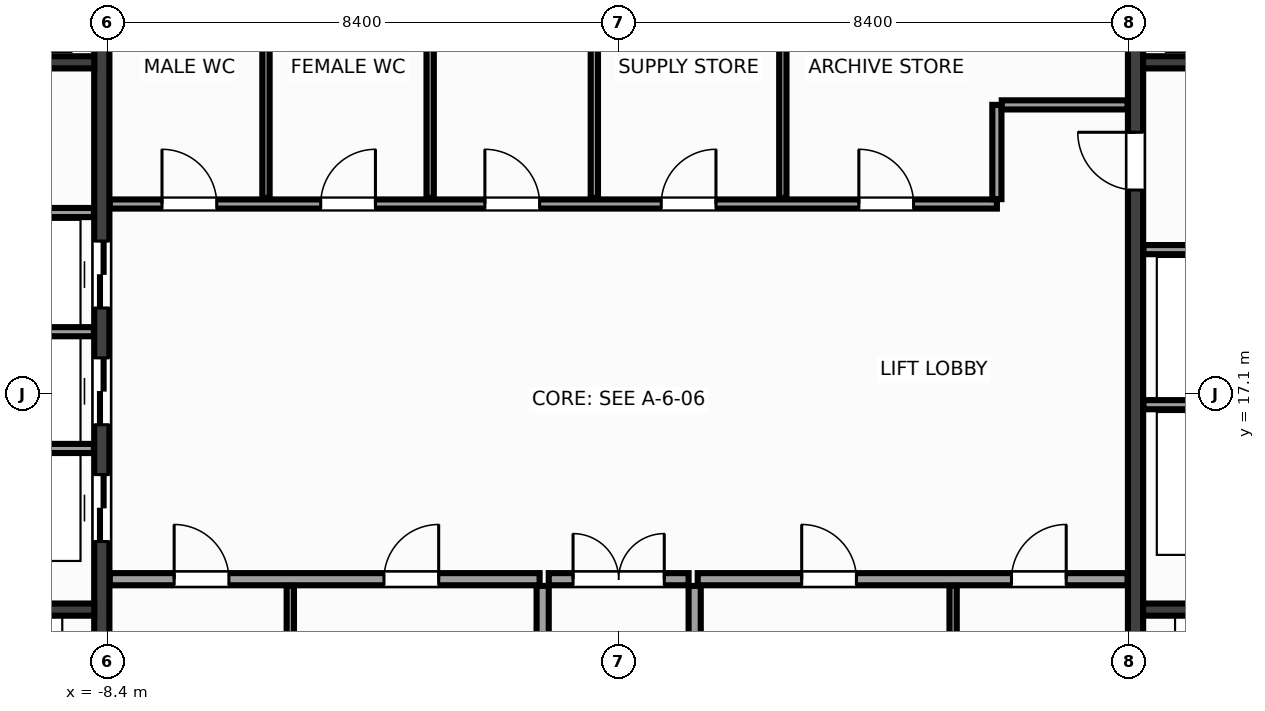
"""IFC4 building model, lengths in metres.
Left out: names, types, materials, properties, quantities, classifications, styles, units other than length and angle.
Written with IfcOpenShell. Run it as: python <this file> out.ifc"""

import sys

from ifc_helpers import new_model, si_unit, direction, frame, frame_2d, origin, place, context, subcontext, project, spatial, rectangle, extrude, source, transform, mapped, element, fill, save


model = new_model("IFC4")
c1 = context("Model", 3, precision=1e-05, world=origin(), true_north=direction((0.0, 1.0)))
c2 = subcontext(c1, "Body", "Model", "MODEL_VIEW")
j1 = project(units=[si_unit("LENGTHUNIT", "METRE"), si_unit("PLANEANGLEUNIT", "RADIAN")], contexts=[c1])
p1 = place(None, origin())
s1 = spatial("IfcSite", under=j1, at=p1, CompositionType="ELEMENT")
p2 = place(p1, origin())
s2 = spatial("IfcBuilding", under=s1, at=p2, CompositionType="ELEMENT")
p3 = place(p2, frame((0.0, 0.0, 261.2)))
s3 = spatial("IfcBuildingStorey", under=s2, at=p3, CompositionType="ELEMENT", Elevation=261.2)
m1 = source(origin(), c2, "Body", "SweptSolid", [
    extrude(rectangle(XDim=13.1, YDim=0.25, at=frame_2d((6.55, 0.0))), origin(), (0.0, 0.0, 1.0), 3.6),
])
p4 = place(p3, frame((-8.5, 10.45, 0.0), z_axis=(0.0, 0.0, 1.0), x_axis=(0.0, 1.0, 0.0)))
e1 = element("IfcWall", 1, at=p4, inside=s3, PredefinedType="SHEAR", context=c2, shape_type="MappedRepresentation", body=[
    mapped(m1, transform((0.0, 0.0, 0.0), x_axis=(1.0, 0.0, 0.0), y_axis=(0.0, 1.0, 0.0), z_axis=(0.0, 0.0, 1.0), scale=1.0)),
])
p5 = place(p4, frame((4.22, 0.0, 0.0)))
e2 = element("IfcOpeningElement", 2, at=p5, cuts=e1, PredefinedType="OPENING", context=c2, shape_type="SweptSolid", body=[
    extrude(rectangle(XDim=1.1, YDim=2.15, at=frame_2d((0.55, 1.075))), frame((0.0, 0.137, 0.0), z_axis=(0.0, -1.0, 0.0), x_axis=(1.0, 0.0, 0.0)), (0.0, 0.0, 1.0), 0.274),
])
p6 = place(p4, frame((6.14, 0.0, 0.0)))
e3 = element("IfcOpeningElement", 3, at=p6, cuts=e1, PredefinedType="OPENING", context=c2, shape_type="SweptSolid", body=[
    extrude(rectangle(XDim=1.1, YDim=2.15, at=frame_2d((0.55, 1.075))), frame((0.0, 0.137, 0.0), z_axis=(0.0, -1.0, 0.0), x_axis=(1.0, 0.0, 0.0)), (0.0, 0.0, 1.0), 0.274),
])
p7 = place(p4, frame((8.06, 0.0, 0.0)))
e4 = element("IfcOpeningElement", 4, at=p7, cuts=e1, PredefinedType="OPENING", context=c2, shape_type="SweptSolid", body=[
    extrude(rectangle(XDim=1.1, YDim=2.15, at=frame_2d((0.55, 1.075))), frame((0.0, 0.137, 0.0), z_axis=(0.0, -1.0, 0.0), x_axis=(1.0, 0.0, 0.0)), (0.0, 0.0, 1.0), 0.274),
])
p8 = place(p3, frame((8.5, 10.45, 0.0), z_axis=(0.0, 0.0, 1.0), x_axis=(0.0, 1.0, 0.0)))
e5 = element("IfcWall", 5, at=p8, inside=s3, PredefinedType="SHEAR", context=c2, shape_type="MappedRepresentation", body=[
    mapped(m1, transform((0.0, 0.0, 0.0), x_axis=(1.0, 0.0, 0.0), y_axis=(0.0, 1.0, 0.0), z_axis=(0.0, 0.0, 1.0), scale=1.0)),
])
p9 = place(p8, frame((10.0, 0.0, 0.0)))
e6 = element("IfcOpeningElement", 6, at=p9, cuts=e5, PredefinedType="OPENING", context=c2, shape_type="SweptSolid", body=[
    extrude(rectangle(XDim=0.95, YDim=2.15, at=frame_2d((0.475, 1.075))), frame((0.0, 0.137, 0.0), z_axis=(0.0, -1.0, 0.0), x_axis=(1.0, 0.0, 0.0)), (0.0, 0.0, 1.0), 0.274),
])
m2 = source(origin(), c2, "Body", "SweptSolid", [
    extrude(rectangle(XDim=2.825, YDim=0.2, at=frame_2d((1.413, 0.0))), origin(), (0.0, 0.0, 1.0), 3.6),
])
for number, where, z_axis, x_axis in (
    (7, (-11.45, 13.55, 0.0), (0.0, 0.0, 1.0), (1.0, 0.0, 0.0)),
    (8, (8.625, 13.55, 0.0), (0.0, 0.0, 1.0), (1.0, 0.0, 0.0)),
):
    element("IfcWall", number, at=place(p3, frame(where, z_axis=z_axis, x_axis=x_axis)), inside=s3, PredefinedType="SHEAR", context=c2, shape_type="MappedRepresentation", body=[
        mapped(m2, transform((0.0, 0.0, 0.0), x_axis=(1.0, 0.0, 0.0), y_axis=(0.0, 1.0, 0.0), z_axis=(0.0, 0.0, 1.0), scale=1.0)),
    ])
m3 = source(origin(), c2, "Body", "SweptSolid", [
    extrude(rectangle(XDim=3.02, YDim=0.2, at=frame_2d((1.51, 0.0))), origin(), (0.0, 0.0, 1.0), 3.6),
])
for number, where, z_axis, x_axis in (
    (9, (-11.645, 22.55, 0.0), (0.0, 0.0, 1.0), (1.0, 0.0, 0.0)),
    (10, (8.625, 22.55, 0.0), (0.0, 0.0, 1.0), (1.0, 0.0, 0.0)),
):
    element("IfcWall", number, at=place(p3, frame(where, z_axis=z_axis, x_axis=x_axis)), inside=s3, PredefinedType="SHEAR", context=c2, shape_type="MappedRepresentation", body=[
        mapped(m3, transform((0.0, 0.0, 0.0), x_axis=(1.0, 0.0, 0.0), y_axis=(0.0, 1.0, 0.0), z_axis=(0.0, 0.0, 1.0), scale=1.0)),
    ])
m4 = source(origin(), c2, "Body", "SweptSolid", [
    extrude(rectangle(XDim=3.01, YDim=0.15, at=frame_2d((1.505, 0.0))), origin(), (0.0, 0.0, 1.0), 3.37),
])
for number, where, z_axis, x_axis in (
    (11, (-11.64, 16.2, 0.0), (0.0, 0.0, 1.0), (1.0, 0.0, 0.0)),
    (12, (-11.64, 18.12, 0.0), (0.0, 0.0, 1.0), (1.0, 0.0, 0.0)),
    (13, (-11.64, 20.08, 0.0), (0.0, 0.0, 1.0), (1.0, 0.0, 0.0)),
    (14, (8.63, 16.92, 0.0), (0.0, 0.0, 1.0), (1.0, 0.0, 0.0)),
    (15, (8.63, 19.47, 0.0), (0.0, 0.0, 1.0), (1.0, 0.0, 0.0)),
):
    element("IfcWall", number, at=place(p3, frame(where, z_axis=z_axis, x_axis=x_axis)), inside=s3, PredefinedType="PARTITIONING", context=c2, shape_type="MappedRepresentation", body=[
        mapped(m4, transform((0.0, 0.0, 0.0), x_axis=(1.0, 0.0, 0.0), y_axis=(0.0, 1.0, 0.0), z_axis=(0.0, 0.0, 1.0), scale=1.0)),
    ])
m5 = source(origin(), c2, "Body", "SweptSolid", [
    extrude(rectangle(XDim=7.07, YDim=0.2, at=frame_2d((3.535, 0.0))), origin(), (0.0, 0.0, 1.0), 3.37),
])
p10 = place(p3, frame((-8.37, 14.05, 0.0), z_axis=(0.0, 0.0, 1.0), x_axis=(1.0, 0.0, 0.0)))
e16 = element("IfcWall", 16, at=p10, inside=s3, PredefinedType="PARTITIONING", context=c2, shape_type="MappedRepresentation", body=[
    mapped(m5, transform((0.0, 0.0, 0.0), x_axis=(1.0, 0.0, 0.0), y_axis=(0.0, 1.0, 0.0), z_axis=(0.0, 0.0, 1.0), scale=1.0)),
])
p11 = place(p10, frame((1.06, 0.0, 0.0)))
e17 = element("IfcOpeningElement", 17, at=p11, cuts=e16, PredefinedType="OPENING", context=c2, shape_type="SweptSolid", body=[
    extrude(rectangle(XDim=0.9, YDim=2.15, at=frame_2d((0.45, 1.075))), frame((0.0, 0.112, 0.0), z_axis=(0.0, -1.0, 0.0), x_axis=(1.0, 0.0, 0.0)), (0.0, 0.0, 1.0), 0.224),
])
p12 = place(p10, frame((4.51, 0.0, 0.0)))
e18 = element("IfcOpeningElement", 18, at=p12, cuts=e16, PredefinedType="OPENING", context=c2, shape_type="SweptSolid", body=[
    extrude(rectangle(XDim=0.9, YDim=2.15, at=frame_2d((0.45, 1.075))), frame((0.0, 0.112, 0.0), z_axis=(0.0, -1.0, 0.0), x_axis=(1.0, 0.0, 0.0)), (0.0, 0.0, 1.0), 0.224),
])
p13 = place(p3, frame((1.3, 14.05, 0.0), z_axis=(0.0, 0.0, 1.0), x_axis=(1.0, 0.0, 0.0)))
e19 = element("IfcWall", 19, at=p13, inside=s3, PredefinedType="PARTITIONING", context=c2, shape_type="MappedRepresentation", body=[
    mapped(m5, transform((0.0, 0.0, 0.0), x_axis=(1.0, 0.0, 0.0), y_axis=(0.0, 1.0, 0.0), z_axis=(0.0, 0.0, 1.0), scale=1.0)),
])
p14 = place(p13, frame((1.71, 0.0, 0.0)))
e20 = element("IfcOpeningElement", 20, at=p14, cuts=e19, PredefinedType="OPENING", context=c2, shape_type="SweptSolid", body=[
    extrude(rectangle(XDim=0.9, YDim=2.15, at=frame_2d((0.45, 1.075))), frame((0.0, 0.112, 0.0), z_axis=(0.0, -1.0, 0.0), x_axis=(1.0, 0.0, 0.0)), (0.0, 0.0, 1.0), 0.224),
])
p15 = place(p13, frame((5.16, 0.0, 0.0)))
e21 = element("IfcOpeningElement", 21, at=p15, cuts=e19, PredefinedType="OPENING", context=c2, shape_type="SweptSolid", body=[
    extrude(rectangle(XDim=0.9, YDim=2.15, at=frame_2d((0.45, 1.075))), frame((0.0, 0.112, 0.0), z_axis=(0.0, -1.0, 0.0), x_axis=(1.0, 0.0, 0.0)), (0.0, 0.0, 1.0), 0.224),
])
m6 = source(origin(), c2, "Body", "SweptSolid", [
    extrude(rectangle(XDim=3.49, YDim=0.2, at=frame_2d((1.745, 0.0))), origin(), (0.0, 0.0, 1.0), 3.37),
])
for number, where, z_axis, x_axis in (
    (22, (-1.25, 10.45, 0.0), (0.0, 0.0, 1.0), (0.0, 1.0, 0.0)),
    (23, (1.25, 10.45, 0.0), (0.0, 0.0, 1.0), (0.0, 1.0, 0.0)),
):
    element("IfcWall", number, at=place(p3, frame(where, z_axis=z_axis, x_axis=x_axis)), inside=s3, PredefinedType="PARTITIONING", context=c2, shape_type="MappedRepresentation", body=[
        mapped(m6, transform((0.0, 0.0, 0.0), x_axis=(1.0, 0.0, 0.0), y_axis=(0.0, 1.0, 0.0), z_axis=(0.0, 0.0, 1.0), scale=1.0)),
    ])
m7 = source(origin(), c2, "Body", "SweptSolid", [
    extrude(rectangle(XDim=2.3, YDim=0.2, at=frame_2d((1.15, 0.0))), origin(), (0.0, 0.0, 1.0), 3.37),
])
p16 = place(p3, frame((-1.15, 14.05, 0.0), z_axis=(0.0, 0.0, 1.0), x_axis=(1.0, 0.0, 0.0)))
e24 = element("IfcWall", 24, at=p16, inside=s3, PredefinedType="PARTITIONING", context=c2, shape_type="MappedRepresentation", body=[
    mapped(m7, transform((0.0, 0.0, 0.0), x_axis=(1.0, 0.0, 0.0), y_axis=(0.0, 1.0, 0.0), z_axis=(0.0, 0.0, 1.0), scale=1.0)),
])
p17 = place(p16, frame((0.4, 0.0, 0.0)))
e25 = element("IfcOpeningElement", 25, at=p17, cuts=e24, PredefinedType="OPENING", context=c2, shape_type="SweptSolid", body=[
    extrude(rectangle(XDim=1.5, YDim=2.2, at=frame_2d((0.75, 1.1))), frame((0.0, 0.112, 0.0), z_axis=(0.0, -1.0, 0.0), x_axis=(1.0, 0.0, 0.0)), (0.0, 0.0, 1.0), 0.224),
])
m8 = source(origin(), c2, "Body", "SweptSolid", [
    extrude(rectangle(XDim=14.59, YDim=0.15, at=frame_2d((7.295, 0.0))), origin(), (0.0, 0.0, 1.0), 3.37),
])
p18 = place(p3, frame((-8.37, 20.22, 0.0), z_axis=(0.0, 0.0, 1.0), x_axis=(1.0, 0.0, 0.0)))
e26 = element("IfcWall", 26, at=p18, inside=s3, PredefinedType="PARTITIONING", context=c2, shape_type="MappedRepresentation", body=[
    mapped(m8, transform((0.0, 0.0, 0.0), x_axis=(1.0, 0.0, 0.0), y_axis=(0.0, 1.0, 0.0), z_axis=(0.0, 0.0, 1.0), scale=1.0)),
])
p19 = place(p18, frame((0.86, 0.0, 0.0)))
e27 = element("IfcOpeningElement", 27, at=p19, cuts=e26, PredefinedType="OPENING", context=c2, shape_type="SweptSolid", body=[
    extrude(rectangle(XDim=0.9, YDim=2.15, at=frame_2d((0.45, 1.075))), frame((0.0, 0.087, 0.0), z_axis=(0.0, -1.0, 0.0), x_axis=(1.0, 0.0, 0.0)), (0.0, 0.0, 1.0), 0.174),
])
p20 = place(p18, frame((3.47, 0.0, 0.0)))
e28 = element("IfcOpeningElement", 28, at=p20, cuts=e26, PredefinedType="OPENING", context=c2, shape_type="SweptSolid", body=[
    extrude(rectangle(XDim=0.9, YDim=2.15, at=frame_2d((0.45, 1.075))), frame((0.0, 0.087, 0.0), z_axis=(0.0, -1.0, 0.0), x_axis=(1.0, 0.0, 0.0)), (0.0, 0.0, 1.0), 0.174),
])
p21 = place(p18, frame((6.17, 0.0, 0.0)))
e29 = element("IfcOpeningElement", 29, at=p21, cuts=e26, PredefinedType="OPENING", context=c2, shape_type="SweptSolid", body=[
    extrude(rectangle(XDim=0.9, YDim=2.15, at=frame_2d((0.45, 1.075))), frame((0.0, 0.087, 0.0), z_axis=(0.0, -1.0, 0.0), x_axis=(1.0, 0.0, 0.0)), (0.0, 0.0, 1.0), 0.174),
])
p22 = place(p18, frame((9.07, 0.0, 0.0)))
e30 = element("IfcOpeningElement", 30, at=p22, cuts=e26, PredefinedType="OPENING", context=c2, shape_type="SweptSolid", body=[
    extrude(rectangle(XDim=0.9, YDim=2.15, at=frame_2d((0.45, 1.075))), frame((0.0, 0.087, 0.0), z_axis=(0.0, -1.0, 0.0), x_axis=(1.0, 0.0, 0.0)), (0.0, 0.0, 1.0), 0.174),
])
p23 = place(p18, frame((12.32, 0.0, 0.0)))
e31 = element("IfcOpeningElement", 31, at=p23, cuts=e26, PredefinedType="OPENING", context=c2, shape_type="SweptSolid", body=[
    extrude(rectangle(XDim=0.9, YDim=2.15, at=frame_2d((0.45, 1.075))), frame((0.0, 0.087, 0.0), z_axis=(0.0, -1.0, 0.0), x_axis=(1.0, 0.0, 0.0)), (0.0, 0.0, 1.0), 0.174),
])
m9 = source(origin(), c2, "Body", "SweptSolid", [
    extrude(rectangle(XDim=1.55, YDim=0.15, at=frame_2d((0.775, 0.0))), origin(), (0.0, 0.0, 1.0), 3.37),
])
p24 = place(p3, frame((6.22, 20.3, 0.0), z_axis=(0.0, 0.0, 1.0), x_axis=(0.0, 1.0, 0.0)))
e32 = element("IfcWall", 32, at=p24, inside=s3, PredefinedType="PARTITIONING", context=c2, shape_type="MappedRepresentation", body=[
    mapped(m9, transform((0.0, 0.0, 0.0), x_axis=(1.0, 0.0, 0.0), y_axis=(0.0, 1.0, 0.0), z_axis=(0.0, 0.0, 1.0), scale=1.0)),
])
m10 = source(origin(), c2, "Body", "SweptSolid", [
    extrude(rectangle(XDim=2.07, YDim=0.15, at=frame_2d((1.035, 0.0))), origin(), (0.0, 0.0, 1.0), 3.37),
])
p25 = place(p3, frame((6.3, 21.85, 0.0), z_axis=(0.0, 0.0, 1.0), x_axis=(1.0, 0.0, 0.0)))
e33 = element("IfcWall", 33, at=p25, inside=s3, PredefinedType="PARTITIONING", context=c2, shape_type="MappedRepresentation", body=[
    mapped(m10, transform((0.0, 0.0, 0.0), x_axis=(1.0, 0.0, 0.0), y_axis=(0.0, 1.0, 0.0), z_axis=(0.0, 0.0, 1.0), scale=1.0)),
])
m11 = source(origin(), c2, "Body", "SweptSolid", [
    extrude(rectangle(XDim=3.49, YDim=0.12, at=frame_2d((1.745, 0.0))), origin(), (0.0, 0.0, 1.0), 3.37),
])
for number, where, z_axis, x_axis in (
    (34, (-5.4, 10.45, 0.0), (0.0, 0.0, 1.0), (0.0, 1.0, 0.0)),
    (35, (5.5, 10.45, 0.0), (0.0, 0.0, 1.0), (0.0, 1.0, 0.0)),
):
    element("IfcWall", number, at=place(p3, frame(where, z_axis=z_axis, x_axis=x_axis)), inside=s3, PredefinedType="PARTITIONING", context=c2, shape_type="MappedRepresentation", body=[
        mapped(m11, transform((0.0, 0.0, 0.0), x_axis=(1.0, 0.0, 0.0), y_axis=(0.0, 1.0, 0.0), z_axis=(0.0, 0.0, 1.0), scale=1.0)),
    ])
m12 = source(origin(), c2, "Body", "SweptSolid", [
    extrude(rectangle(XDim=3.19, YDim=0.12, at=frame_2d((1.595, 0.0))), origin(), (0.0, 0.0, 1.0), 3.37),
])
for number, where, z_axis, x_axis in (
    (36, (-5.8, 20.32, 0.0), (0.0, 0.0, 1.0), (0.0, 1.0, 0.0)),
    (37, (-3.1, 20.32, 0.0), (0.0, 0.0, 1.0), (0.0, 1.0, 0.0)),
    (38, (-0.4, 20.32, 0.0), (0.0, 0.0, 1.0), (0.0, 1.0, 0.0)),
    (39, (2.7, 20.32, 0.0), (0.0, 0.0, 1.0), (0.0, 1.0, 0.0)),
):
    element("IfcWall", number, at=place(p3, frame(where, z_axis=z_axis, x_axis=x_axis)), inside=s3, PredefinedType="PARTITIONING", context=c2, shape_type="MappedRepresentation", body=[
        mapped(m12, transform((0.0, 0.0, 0.0), x_axis=(1.0, 0.0, 0.0), y_axis=(0.0, 1.0, 0.0), z_axis=(0.0, 0.0, 1.0), scale=1.0)),
    ])
m13 = source(origin(), c2, "Body", "SweptSolid", [
    extrude(rectangle(XDim=1.1, YDim=2.15, at=frame_2d((0.55, 1.075))), frame((0.0, 0.025, 0.0), z_axis=(0.0, -1.0, 0.0), x_axis=(1.0, 0.0, 0.0)), (0.0, 0.0, 1.0), 0.05),
])
p26 = place(p5, origin())
e40 = element("IfcDoor", 40, at=p26, inside=s3, OperationType="DOUBLE_DOOR_SLIDING", PredefinedType="DOOR", context=c2, shape_type="MappedRepresentation", body=[
    mapped(m13, transform((0.0, 0.0, 0.0), x_axis=(1.0, 0.0, 0.0), y_axis=(0.0, 1.0, 0.0), z_axis=(0.0, 0.0, 1.0), scale=1.0)),
])
fill(e2, e40)
p27 = place(p6, origin())
e41 = element("IfcDoor", 41, at=p27, inside=s3, OperationType="DOUBLE_DOOR_SLIDING", PredefinedType="DOOR", context=c2, shape_type="MappedRepresentation", body=[
    mapped(m13, transform((0.0, 0.0, 0.0), x_axis=(1.0, 0.0, 0.0), y_axis=(0.0, 1.0, 0.0), z_axis=(0.0, 0.0, 1.0), scale=1.0)),
])
fill(e3, e41)
p28 = place(p7, origin())
e42 = element("IfcDoor", 42, at=p28, inside=s3, OperationType="DOUBLE_DOOR_SLIDING", PredefinedType="DOOR", context=c2, shape_type="MappedRepresentation", body=[
    mapped(m13, transform((0.0, 0.0, 0.0), x_axis=(1.0, 0.0, 0.0), y_axis=(0.0, 1.0, 0.0), z_axis=(0.0, 0.0, 1.0), scale=1.0)),
])
fill(e4, e42)
m14 = source(origin(), c2, "Body", "SweptSolid", [
    extrude(rectangle(XDim=0.95, YDim=2.15, at=frame_2d((0.475, 1.075))), frame((0.0, 0.025, 0.0), z_axis=(0.0, -1.0, 0.0), x_axis=(1.0, 0.0, 0.0)), (0.0, 0.0, 1.0), 0.05),
])
p29 = place(p9, origin())
e43 = element("IfcDoor", 43, at=p29, inside=s3, OperationType="SINGLE_SWING_RIGHT", PredefinedType="DOOR", context=c2, shape_type="MappedRepresentation", body=[
    mapped(m14, transform((0.0, 0.0, 0.0), x_axis=(1.0, 0.0, 0.0), y_axis=(0.0, 1.0, 0.0), z_axis=(0.0, 0.0, 1.0), scale=1.0)),
])
fill(e6, e43)
m15 = source(origin(), c2, "Body", "SweptSolid", [
    extrude(rectangle(XDim=0.9, YDim=2.15, at=frame_2d((0.45, 1.075))), frame((0.0, 0.025, 0.0), z_axis=(0.0, -1.0, 0.0), x_axis=(1.0, 0.0, 0.0)), (0.0, 0.0, 1.0), 0.05),
])
p30 = place(p11, origin())
e44 = element("IfcDoor", 44, at=p30, inside=s3, OperationType="SINGLE_SWING_LEFT", PredefinedType="DOOR", context=c2, shape_type="MappedRepresentation", body=[
    mapped(m15, transform((0.0, 0.0, 0.0), x_axis=(1.0, 0.0, 0.0), y_axis=(0.0, 1.0, 0.0), z_axis=(0.0, 0.0, 1.0), scale=1.0)),
])
fill(e17, e44)
p31 = place(p12, origin())
e45 = element("IfcDoor", 45, at=p31, inside=s3, OperationType="SINGLE_SWING_RIGHT", PredefinedType="DOOR", context=c2, shape_type="MappedRepresentation", body=[
    mapped(m15, transform((0.0, 0.0, 0.0), x_axis=(1.0, 0.0, 0.0), y_axis=(0.0, 1.0, 0.0), z_axis=(0.0, 0.0, 1.0), scale=1.0)),
])
fill(e18, e45)
p32 = place(p14, origin())
e46 = element("IfcDoor", 46, at=p32, inside=s3, OperationType="SINGLE_SWING_LEFT", PredefinedType="DOOR", context=c2, shape_type="MappedRepresentation", body=[
    mapped(m15, transform((0.0, 0.0, 0.0), x_axis=(1.0, 0.0, 0.0), y_axis=(0.0, 1.0, 0.0), z_axis=(0.0, 0.0, 1.0), scale=1.0)),
])
fill(e20, e46)
p33 = place(p15, origin())
e47 = element("IfcDoor", 47, at=p33, inside=s3, OperationType="SINGLE_SWING_RIGHT", PredefinedType="DOOR", context=c2, shape_type="MappedRepresentation", body=[
    mapped(m15, transform((0.0, 0.0, 0.0), x_axis=(1.0, 0.0, 0.0), y_axis=(0.0, 1.0, 0.0), z_axis=(0.0, 0.0, 1.0), scale=1.0)),
])
fill(e21, e47)
m16 = source(origin(), c2, "Body", "SweptSolid", [
    extrude(rectangle(XDim=1.5, YDim=2.2, at=frame_2d((0.75, 1.1))), frame((0.0, 0.025, 0.0), z_axis=(0.0, -1.0, 0.0), x_axis=(1.0, 0.0, 0.0)), (0.0, 0.0, 1.0), 0.05),
])
p34 = place(p17, origin())
e48 = element("IfcDoor", 48, at=p34, inside=s3, OperationType="DOUBLE_DOOR_SINGLE_SWING", PredefinedType="DOOR", context=c2, shape_type="MappedRepresentation", body=[
    mapped(m16, transform((0.0, 0.0, 0.0), x_axis=(1.0, 0.0, 0.0), y_axis=(0.0, 1.0, 0.0), z_axis=(0.0, 0.0, 1.0), scale=1.0)),
])
fill(e25, e48)
p35 = place(p19, origin())
e49 = element("IfcDoor", 49, at=p35, inside=s3, OperationType="SINGLE_SWING_LEFT", PredefinedType="DOOR", context=c2, shape_type="MappedRepresentation", body=[
    mapped(m15, transform((0.0, 0.0, 0.0), x_axis=(1.0, 0.0, 0.0), y_axis=(0.0, 1.0, 0.0), z_axis=(0.0, 0.0, 1.0), scale=1.0)),
])
fill(e27, e49)
p36 = place(p20, origin())
e50 = element("IfcDoor", 50, at=p36, inside=s3, OperationType="SINGLE_SWING_RIGHT", PredefinedType="DOOR", context=c2, shape_type="MappedRepresentation", body=[
    mapped(m15, transform((0.0, 0.0, 0.0), x_axis=(1.0, 0.0, 0.0), y_axis=(0.0, 1.0, 0.0), z_axis=(0.0, 0.0, 1.0), scale=1.0)),
])
fill(e28, e50)
p37 = place(p21, origin())
e51 = element("IfcDoor", 51, at=p37, inside=s3, OperationType="SINGLE_SWING_LEFT", PredefinedType="DOOR", context=c2, shape_type="MappedRepresentation", body=[
    mapped(m15, transform((0.0, 0.0, 0.0), x_axis=(1.0, 0.0, 0.0), y_axis=(0.0, 1.0, 0.0), z_axis=(0.0, 0.0, 1.0), scale=1.0)),
])
fill(e29, e51)
p38 = place(p22, origin())
e52 = element("IfcDoor", 52, at=p38, inside=s3, OperationType="SINGLE_SWING_RIGHT", PredefinedType="DOOR", context=c2, shape_type="MappedRepresentation", body=[
    mapped(m15, transform((0.0, 0.0, 0.0), x_axis=(1.0, 0.0, 0.0), y_axis=(0.0, 1.0, 0.0), z_axis=(0.0, 0.0, 1.0), scale=1.0)),
])
fill(e30, e52)
p39 = place(p23, origin())
e53 = element("IfcDoor", 53, at=p39, inside=s3, OperationType="SINGLE_SWING_LEFT", PredefinedType="DOOR", context=c2, shape_type="MappedRepresentation", body=[
    mapped(m15, transform((0.0, 0.0, 0.0), x_axis=(1.0, 0.0, 0.0), y_axis=(0.0, 1.0, 0.0), z_axis=(0.0, 0.0, 1.0), scale=1.0)),
])
fill(e31, e53)
save(model, sys.argv[1])
